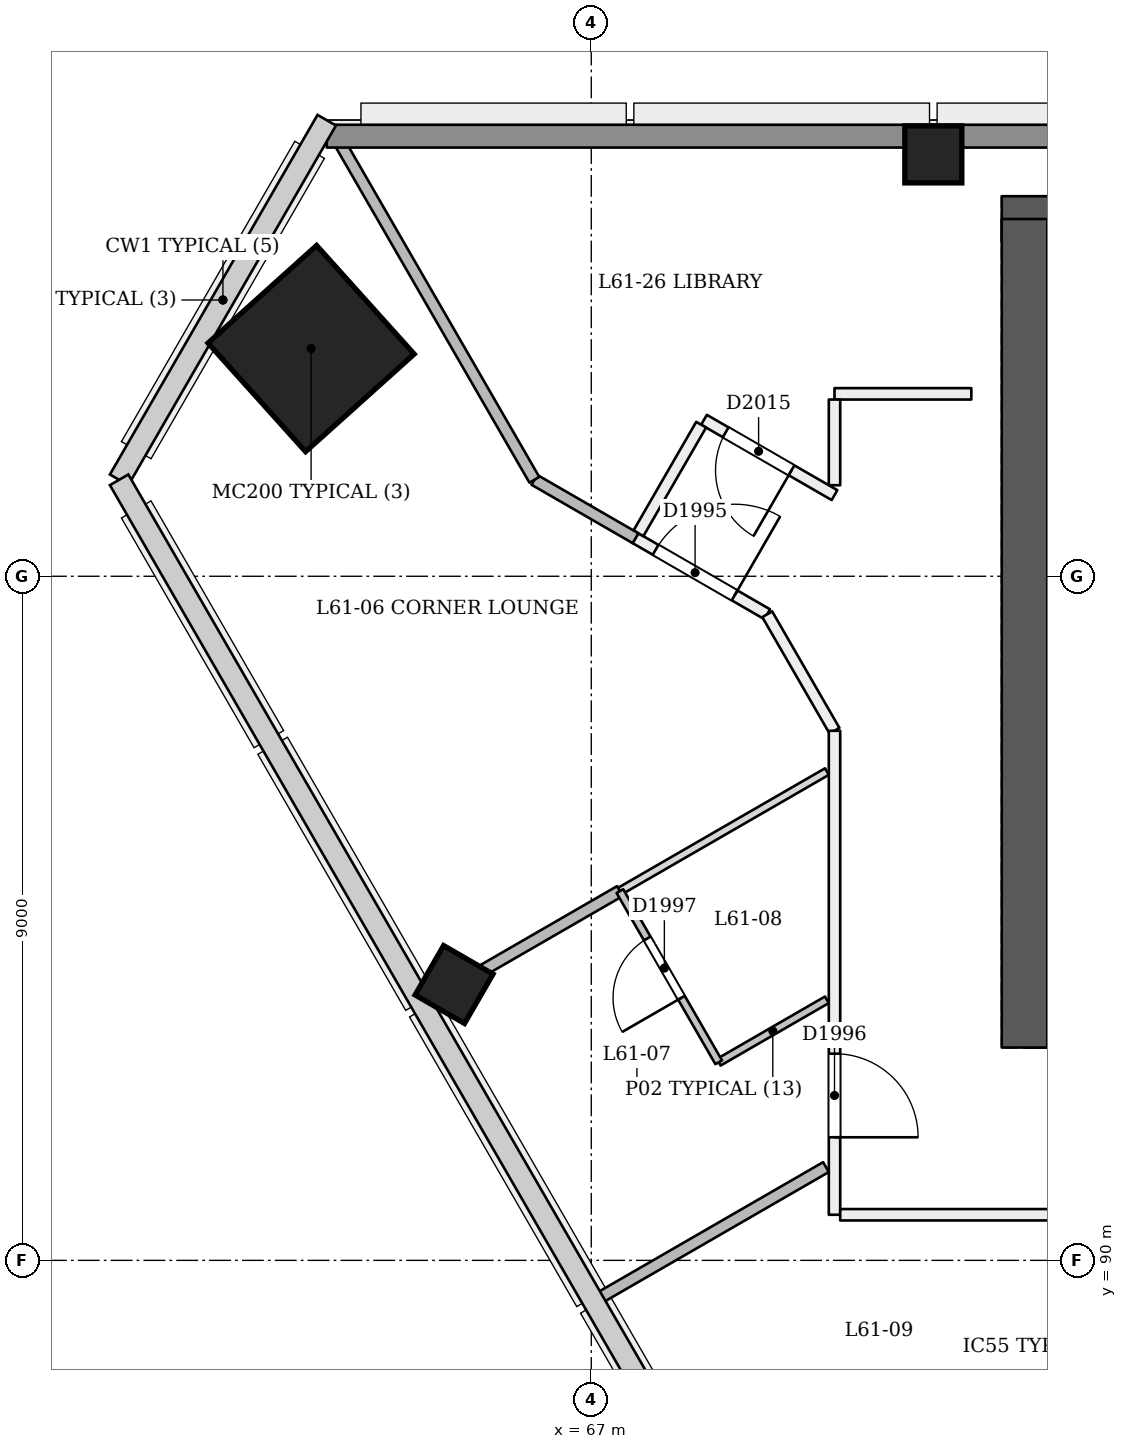
"""IFC4 building model, lengths in metres.
Left out: names, types, materials, properties, quantities, classifications, styles, units other than length and angle.
Written with IfcOpenShell. Run it as: python <this file> out.ifc"""

import sys

from ifc_helpers import new_model, si_unit, direction, frame, frame_2d, origin, origin_2d, place, context, subcontext, project, spatial, rectangle, extrude, element, fill, save


model = new_model("IFC4")
c1 = context("Model", 3, precision=1e-05, world=origin(), true_north=direction((0.0, 1.0)))
c2 = subcontext(c1, "Body", "Model", "MODEL_VIEW")
j1 = project(units=[si_unit("LENGTHUNIT", "METRE"), si_unit("PLANEANGLEUNIT", "RADIAN")], contexts=[c1])
p1 = place(None, origin())
s1 = spatial("IfcSite", under=j1, at=p1, CompositionType="ELEMENT")
p2 = place(p1, origin())
s2 = spatial("IfcBuilding", under=s1, at=p2, CompositionType="ELEMENT")
p3 = place(p2, frame((0.0, 0.0, 239.2)))
s3 = spatial("IfcBuildingStorey", under=s2, at=p3, CompositionType="ELEMENT", Elevation=239.2)
p4 = place(p3, frame((72.7, 93.1, 0.0), z_axis=(0.0, 0.0, 1.0), x_axis=(1.0, 0.0, 0.0)))
e1 = element("IfcWall", 1, at=p4, inside=s3, PredefinedType="SHEAR", context=c2, shape_type="SweptSolid", body=[
    extrude(rectangle(XDim=24.9, YDim=0.6, at=frame_2d((12.45, 0.0))), origin(), (0.0, 0.0, 1.0), 3.6),
])
p5 = place(p4, frame((1.1, 0.0, 0.0)))
e2 = element("IfcOpeningElement", 2, at=p5, cuts=e1, PredefinedType="OPENING", context=c2, shape_type="SweptSolid", body=[
    extrude(rectangle(XDim=1.2, YDim=2.1, at=frame_2d((0.6, 1.05))), frame((0.0, 0.311, 0.0), z_axis=(0.0, -1.0, 0.0), x_axis=(1.0, 0.0, 0.0)), (0.0, 0.0, 1.0), 0.621),
])
p6 = place(p4, frame((3.3, 0.0, 0.0)))
e3 = element("IfcOpeningElement", 3, at=p6, cuts=e1, PredefinedType="OPENING", context=c2, shape_type="SweptSolid", body=[
    extrude(rectangle(XDim=1.2, YDim=2.1, at=frame_2d((0.6, 1.05))), frame((0.0, 0.311, 0.0), z_axis=(0.0, -1.0, 0.0), x_axis=(1.0, 0.0, 0.0)), (0.0, 0.0, 1.0), 0.621),
])
p7 = place(p4, frame((13.3, 0.0, 0.0)))
e4 = element("IfcOpeningElement", 4, at=p7, cuts=e1, PredefinedType="OPENING", context=c2, shape_type="SweptSolid", body=[
    extrude(rectangle(XDim=1.2, YDim=2.1, at=frame_2d((0.6, 1.05))), frame((0.0, 0.311, 0.0), z_axis=(0.0, -1.0, 0.0), x_axis=(1.0, 0.0, 0.0)), (0.0, 0.0, 1.0), 0.621),
])
p8 = place(p4, frame((15.562, 0.0, 0.0)))
e5 = element("IfcOpeningElement", 5, at=p8, cuts=e1, PredefinedType="OPENING", context=c2, shape_type="SweptSolid", body=[
    extrude(rectangle(XDim=1.0, YDim=2.1, at=frame_2d((0.5, 1.05))), frame((0.0, 0.311, 0.0), z_axis=(0.0, -1.0, 0.0), x_axis=(1.0, 0.0, 0.0)), (0.0, 0.0, 1.0), 0.621),
])
p9 = place(p4, frame((18.2, 0.0, 0.0)))
e6 = element("IfcOpeningElement", 6, at=p9, cuts=e1, PredefinedType="OPENING", context=c2, shape_type="SweptSolid", body=[
    extrude(rectangle(XDim=1.0, YDim=2.1, at=frame_2d((0.5, 1.05))), frame((0.0, 0.311, 0.0), z_axis=(0.0, -1.0, 0.0), x_axis=(1.0, 0.0, 0.0)), (0.0, 0.0, 1.0), 0.621),
])
p10 = place(p4, frame((21.788, 0.0, 0.0)))
e7 = element("IfcOpeningElement", 7, at=p10, cuts=e1, PredefinedType="OPENING", context=c2, shape_type="SweptSolid", body=[
    extrude(rectangle(XDim=1.0, YDim=2.1, at=frame_2d((0.5, 1.05))), frame((0.0, 0.311, 0.0), z_axis=(0.0, -1.0, 0.0), x_axis=(1.0, 0.0, 0.0)), (0.0, 0.0, 1.0), 0.621),
])
p11 = place(p3, frame((97.3, 103.7, 0.0), z_axis=(0.0, 0.0, 1.0), x_axis=(-1.0, 0.0, 0.0)))
e8 = element("IfcWall", 8, at=p11, inside=s3, PredefinedType="SHEAR", context=c2, shape_type="SweptSolid", body=[
    extrude(rectangle(XDim=24.9, YDim=0.6, at=frame_2d((12.45, 0.0))), origin(), (0.0, 0.0, 1.0), 3.6),
])
p12 = place(p3, frame((72.7, 103.7, 0.0), z_axis=(0.0, 0.0, 1.0), x_axis=(0.0, -1.0, 0.0)))
e9 = element("IfcWall", 9, at=p12, inside=s3, PredefinedType="SHEAR", context=c2, shape_type="SweptSolid", body=[
    extrude(rectangle(XDim=10.9, YDim=0.6, at=frame_2d((5.45, 0.0))), origin(), (0.0, 0.0, 1.0), 3.6),
])
p13 = place(p3, frame((63.28, 101.984, 0.0), z_axis=(0.028334066552, 0.009286524205, 0.999555371723), x_axis=(-0.866548432855, 0.498694882943, 0.019930560557)))
e10 = element("IfcColumn", 10, at=p13, inside=s3, PredefinedType="COLUMN", context=c2, shape_type="SweptSolid", body=[
    extrude(rectangle(XDim=1.92, YDim=1.92, at=origin_2d()), origin(), (0.0, 0.0, 1.0), 3.602),
])
p14 = place(p3, frame((71.5, 104.55, 0.0), z_axis=(0.0, 0.0, 1.0), x_axis=(1.0, 0.0, 0.0)))
e11 = element("IfcColumn", 11, at=p14, inside=s3, PredefinedType="COLUMN", context=c2, shape_type="SweptSolid", body=[
    extrude(rectangle(XDim=0.75, YDim=0.75, at=origin_2d()), origin(), (0.0, 0.0, 1.0), 3.6),
])
p15 = place(p3, frame((65.168, 93.582, -0.023), z_axis=(0.02215369191, 0.038413282303, 0.999016333038), x_axis=(-0.86536622594, -0.499666419476, 0.038402659414)))
e12 = element("IfcColumn", 12, at=p15, inside=s3, PredefinedType="COLUMN", context=c2, shape_type="SweptSolid", body=[
    extrude(rectangle(XDim=0.75, YDim=0.75, at=origin_2d()), origin(), (0.0, 0.0, 1.0), 3.604),
])
p16 = place(p3, frame((67.566, 99.51, 0.0), z_axis=(0.0, 0.0, 1.0), x_axis=(0.866040685659, -0.499973530083, 0.0)))
e13 = element("IfcWall", 13, at=p16, inside=s3, PredefinedType="PARTITIONING", context=c2, shape_type="SweptSolid", body=[
    extrude(rectangle(XDim=2.02, YDim=0.15, at=frame_2d((1.01, 0.0))), origin(), (0.0, 0.0, 1.0), 3.2),
])
p17 = place(p16, frame((0.324, 0.0, 0.0)))
e14 = element("IfcOpeningElement", 14, at=p17, cuts=e13, PredefinedType="OPENING", context=c2, shape_type="SweptSolid", body=[
    extrude(rectangle(XDim=1.2, YDim=2.1, at=frame_2d((0.6, 1.05))), frame((0.0, 0.085, 0.0), z_axis=(0.0, -1.0, 0.0), x_axis=(1.0, 0.0, 0.0)), (0.0, 0.0, 1.0), 0.171),
])
p18 = place(p3, frame((69.315, 98.5, 0.0), z_axis=(0.0, 0.0, 1.0), x_axis=(0.499937404092, -0.866061540533, 0.0)))
e15 = element("IfcWall", 15, at=p18, inside=s3, PredefinedType="PARTITIONING", context=c2, shape_type="SweptSolid", body=[
    extrude(rectangle(XDim=1.77, YDim=0.15, at=frame_2d((0.885, 0.0))), origin(), (0.0, 0.0, 1.0), 3.2),
])
p19 = place(p3, frame((70.2, 96.967, 0.0), z_axis=(0.0, 0.0, 1.0), x_axis=(0.0, -1.0, 0.0)))
e16 = element("IfcWall", 16, at=p19, inside=s3, PredefinedType="PARTITIONING", context=c2, shape_type="SweptSolid", body=[
    extrude(rectangle(XDim=6.367, YDim=0.15, at=frame_2d((3.184, 0.0))), origin(), (0.0, 0.0, 1.0), 3.2),
])
p20 = place(p19, frame((4.248, 0.0, 0.0)))
e17 = element("IfcOpeningElement", 17, at=p20, cuts=e16, PredefinedType="OPENING", context=c2, shape_type="SweptSolid", body=[
    extrude(rectangle(XDim=1.1, YDim=2.1, at=frame_2d((0.55, 1.05))), frame((0.0, 0.085, 0.0), z_axis=(0.0, -1.0, 0.0), x_axis=(1.0, 0.0, 0.0)), (0.0, 0.0, 1.0), 0.171),
])
p21 = place(p3, frame((70.275, 90.6, 0.0), z_axis=(0.0, 0.0, 1.0), x_axis=(1.0, 0.0, 0.0)))
e18 = element("IfcWall", 18, at=p21, inside=s3, PredefinedType="PARTITIONING", context=c2, shape_type="SweptSolid", body=[
    extrude(rectangle(XDim=3.601, YDim=0.15, at=frame_2d((1.801, 0.0))), origin(), (0.0, 0.0, 1.0), 3.2),
])
p22 = place(p3, frame((72.0, 101.4, 0.0), z_axis=(0.0, 0.0, 1.0), x_axis=(-1.0, 0.0, 0.0)))
e19 = element("IfcWall", 19, at=p22, inside=s3, PredefinedType="PARTITIONING", context=c2, shape_type="SweptSolid", body=[
    extrude(rectangle(XDim=1.8, YDim=0.15, at=frame_2d((0.9, 0.0))), origin(), (0.0, 0.0, 1.0), 3.2),
])
p23 = place(p3, frame((70.2, 101.325, 0.0), z_axis=(0.0, 0.0, 1.0), x_axis=(0.0, -1.0, 0.0)))
e20 = element("IfcWall", 20, at=p23, inside=s3, PredefinedType="PARTITIONING", context=c2, shape_type="SweptSolid", body=[
    extrude(rectangle(XDim=1.127, YDim=0.15, at=frame_2d((0.564, 0.0))), origin(), (0.0, 0.0, 1.0), 3.2),
])
p24 = place(p3, frame((70.2, 100.068, 0.0), z_axis=(0.0, 0.0, 1.0), x_axis=(-0.866021515814, 0.500006734102, 0.0)))
e21 = element("IfcWall", 21, at=p24, inside=s3, PredefinedType="PARTITIONING", context=c2, shape_type="SweptSolid", body=[
    extrude(rectangle(XDim=1.982, YDim=0.15, at=frame_2d((0.991, 0.0))), origin(), (0.0, 0.0, 1.0), 3.2),
])
p25 = place(p24, frame((0.653, 0.0, 0.0)))
e22 = element("IfcOpeningElement", 22, at=p25, cuts=e21, PredefinedType="OPENING", context=c2, shape_type="SweptSolid", body=[
    extrude(rectangle(XDim=1.0, YDim=2.1, at=frame_2d((0.5, 1.05))), frame((0.0, 0.085, 0.0), z_axis=(0.0, -1.0, 0.0), x_axis=(1.0, 0.0, 0.0)), (0.0, 0.0, 1.0), 0.171),
])
p26 = place(p3, frame((68.446, 100.994, 0.0), z_axis=(0.0, 0.0, 1.0), x_axis=(-0.499974350878, -0.866040211805, 0.0)))
e23 = element("IfcWall", 23, at=p26, inside=s3, PredefinedType="PARTITIONING", context=c2, shape_type="SweptSolid", body=[
    extrude(rectangle(XDim=1.65, YDim=0.15, at=frame_2d((0.825, 0.0))), origin(), (0.0, 0.0, 1.0), 3.2),
])
p27 = place(p3, frame((64.865, 93.408, 0.0), z_axis=(0.0, 0.0, 1.0), x_axis=(0.866032775405, 0.499987231761, 0.0)))
e24 = element("IfcWall", 24, at=p27, inside=s3, PredefinedType="PARTITIONING", context=c2, shape_type="SweptSolid", body=[
    extrude(rectangle(XDim=2.9, YDim=0.15, at=frame_2d((1.45, 0.0))), origin(), (0.0, 0.0, 1.0), 2.7),
])
p28 = place(p3, frame((67.376, 94.858, 0.0), z_axis=(0.0, 0.0, 1.0), x_axis=(0.866056314953, 0.499946456463, 0.0)))
e25 = element("IfcWall", 25, at=p28, inside=s3, PredefinedType="PARTITIONING", context=c2, shape_type="SweptSolid", body=[
    extrude(rectangle(XDim=3.145, YDim=0.1, at=frame_2d((1.572, 0.0))), origin(), (0.0, 0.0, 1.0), 3.2),
])
p29 = place(p3, frame((67.583, 99.5, 0.0), z_axis=(0.0, 0.0, 1.0), x_axis=(-0.866016353143, 0.500015675843, 0.0)))
e26 = element("IfcWall", 26, at=p29, inside=s3, PredefinedType="PARTITIONING", context=c2, shape_type="SweptSolid", body=[
    extrude(rectangle(XDim=1.538, YDim=0.15, at=frame_2d((0.769, 0.0))), origin(), (0.0, 0.0, 1.0), 3.2),
])
p30 = place(p3, frame((66.251, 100.269, 0.0), z_axis=(0.0, 0.0, 1.0), x_axis=(-0.500008311739, 0.866020604947, 0.0)))
e27 = element("IfcWall", 27, at=p30, inside=s3, PredefinedType="PARTITIONING", context=c2, shape_type="SweptSolid", body=[
    extrude(rectangle(XDim=5.348, YDim=0.15, at=frame_2d((2.674, 0.0))), origin(), (0.0, 0.0, 1.0), 2.7),
])
p31 = place(p3, frame((70.1, 93.428, 0.0), z_axis=(0.0, 0.0, 1.0), x_axis=(-0.866059450854, -0.499941024108, 0.0)))
e28 = element("IfcWall", 28, at=p31, inside=s3, PredefinedType="PARTITIONING", context=c2, shape_type="SweptSolid", body=[
    extrude(rectangle(XDim=1.644, YDim=0.1, at=frame_2d((0.822, 0.0))), origin(), (0.0, 0.0, 1.0), 3.2),
])
p32 = place(p3, frame((68.677, 92.606, 0.0), z_axis=(0.0, 0.0, 1.0), x_axis=(-0.500006934395, 0.866021400173, 0.0)))
e29 = element("IfcWall", 29, at=p32, inside=s3, PredefinedType="PARTITIONING", context=c2, shape_type="SweptSolid", body=[
    extrude(rectangle(XDim=2.6, YDim=0.1, at=frame_2d((1.3, 0.0))), origin(), (0.0, 0.0, 1.0), 3.2),
])
p33 = place(p32, frame((0.98, 0.0, 0.0)))
e30 = element("IfcOpeningElement", 30, at=p33, cuts=e29, PredefinedType="OPENING", context=c2, shape_type="SweptSolid", body=[
    extrude(rectangle(XDim=0.9, YDim=2.1, at=frame_2d((0.45, 1.05))), frame((0.0, 0.061, 0.0), z_axis=(0.0, -1.0, 0.0), x_axis=(1.0, 0.0, 0.0)), (0.0, 0.0, 1.0), 0.121),
])
p34 = place(p3, frame((67.097, 89.501, 0.0), z_axis=(0.0, 0.0, 1.0), x_axis=(0.866050167049, 0.499957106315, 0.0)))
e31 = element("IfcWall", 31, at=p34, inside=s3, PredefinedType="PARTITIONING", context=c2, shape_type="SweptSolid", body=[
    extrude(rectangle(XDim=3.452, YDim=0.15, at=frame_2d((1.726, 0.0))), origin(), (0.0, 0.0, 1.0), 2.7),
])
p35 = place(p3, frame((72.396, 87.364, 0.0), z_axis=(0.0, 0.0, 1.0), x_axis=(0.866011447264, 0.500024172624, 0.0)))
e32 = element("IfcWall", 32, at=p35, inside=s3, PredefinedType="PARTITIONING", context=c2, shape_type="SweptSolid", body=[
    extrude(rectangle(XDim=2.825, YDim=0.1, at=frame_2d((1.413, 0.0))), origin(), (0.0, 0.0, 1.0), 2.8),
])
p36 = place(p3, frame((63.52, 104.79, 0.0), z_axis=(0.0, 0.0, 1.0), x_axis=(1.0, 0.0, 0.0)))
e33 = element("IfcWall", 33, at=p36, inside=s3, PredefinedType="SOLIDWALL", context=c2, shape_type="SweptSolid", body=[
    extrude(rectangle(XDim=42.96, YDim=0.3, at=frame_2d((21.48, 0.0))), origin(), (0.0, 0.0, 1.0), 2.7),
])
p37 = place(p17, origin())
e34 = element("IfcDoor", 34, at=p37, inside=s3, OperationType="SINGLE_SWING_RIGHT", PredefinedType="NOTDEFINED", context=c2, shape_type="SweptSolid", body=[
    extrude(rectangle(XDim=1.2, YDim=2.1, at=frame_2d((0.6, 1.05))), frame((0.0, 0.025, 0.0), z_axis=(0.0, -1.0, 0.0), x_axis=(1.0, 0.0, 0.0)), (0.0, 0.0, 1.0), 0.05),
])
fill(e14, e34)
p38 = place(p20, origin())
e35 = element("IfcDoor", 35, at=p38, inside=s3, OperationType="SINGLE_SWING_RIGHT", PredefinedType="NOTDEFINED", context=c2, shape_type="SweptSolid", body=[
    extrude(rectangle(XDim=1.1, YDim=2.1, at=frame_2d((0.55, 1.05))), frame((0.0, 0.025, 0.0), z_axis=(0.0, -1.0, 0.0), x_axis=(1.0, 0.0, 0.0)), (0.0, 0.0, 1.0), 0.05),
])
fill(e17, e35)
p39 = place(p33, origin())
e36 = element("IfcDoor", 36, at=p39, inside=s3, OperationType="SINGLE_SWING_LEFT", PredefinedType="NOTDEFINED", context=c2, shape_type="SweptSolid", body=[
    extrude(rectangle(XDim=0.9, YDim=2.1, at=frame_2d((0.45, 1.05))), frame((0.0, 0.025, 0.0), z_axis=(0.0, -1.0, 0.0), x_axis=(1.0, 0.0, 0.0)), (0.0, 0.0, 1.0), 0.05),
])
fill(e30, e36)
p40 = place(p25, origin())
e37 = element("IfcDoor", 37, at=p40, inside=s3, OperationType="SINGLE_SWING_LEFT", PredefinedType="NOTDEFINED", context=c2, shape_type="SweptSolid", body=[
    extrude(rectangle(XDim=1.0, YDim=2.1, at=frame_2d((0.5, 1.05))), frame((0.0, 0.025, 0.0), z_axis=(0.0, -1.0, 0.0), x_axis=(1.0, 0.0, 0.0)), (0.0, 0.0, 1.0), 0.05),
])
fill(e22, e37)
save(model, sys.argv[1])
